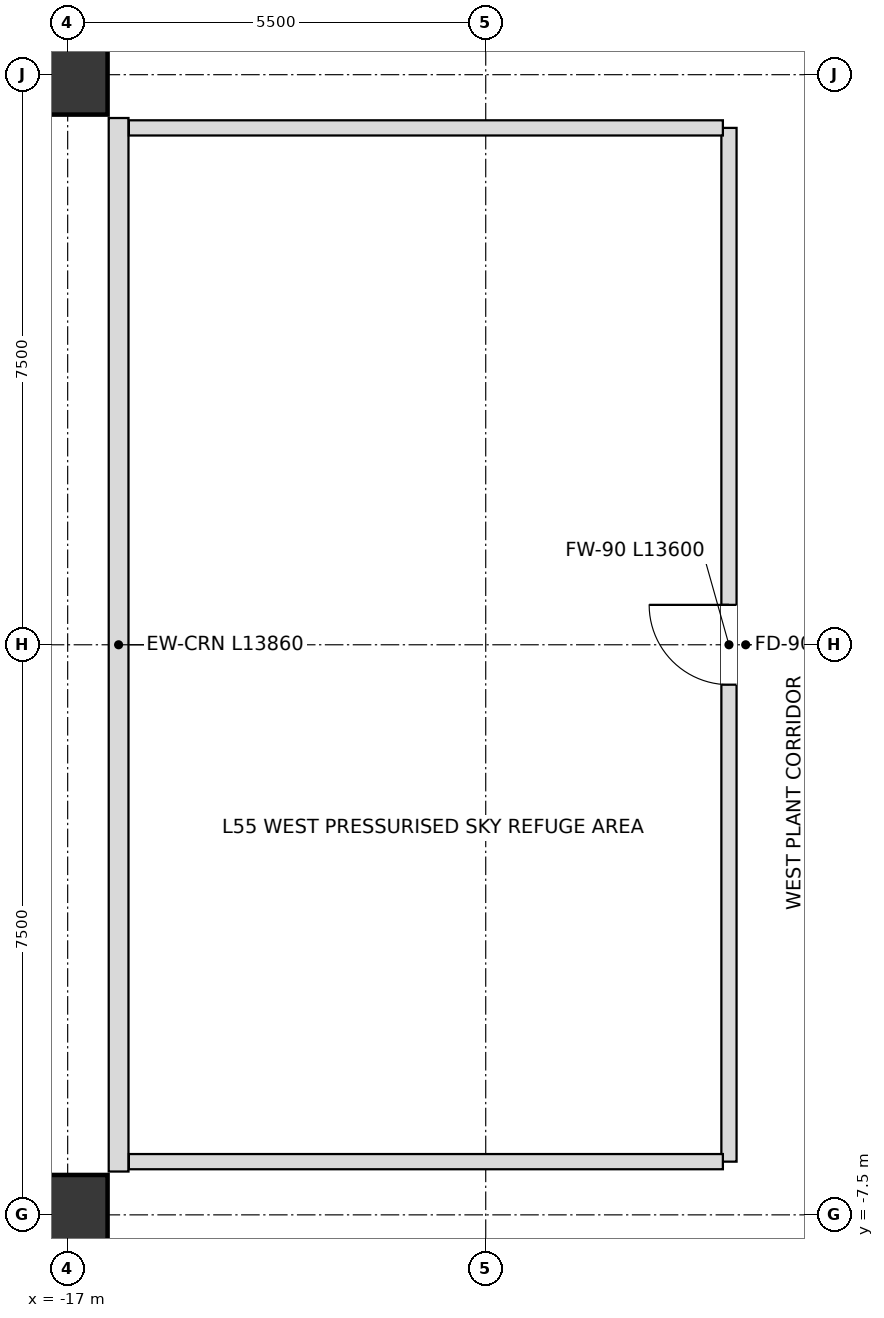
"""IFC4 building model, lengths in metres.
Left out: names, types, materials, properties, quantities, classifications, styles, units other than length and angle.
Written with IfcOpenShell. Run it as: python <this file> out.ifc"""

import sys

from ifc_helpers import new_model, si_unit, direction, frame, frame_2d, origin, origin_2d, place, context, subcontext, project, spatial, rectangle, extrude, element, fill, save


model = new_model("IFC4")
c1 = context("Model", 3, precision=1e-05, world=origin(), true_north=direction((0.0, 1.0)))
c2 = subcontext(c1, "Body", "Model", "MODEL_VIEW")
j1 = project(units=[si_unit("LENGTHUNIT", "METRE"), si_unit("PLANEANGLEUNIT", "RADIAN")], contexts=[c1])
p1 = place(None, origin())
s1 = spatial("IfcSite", under=j1, at=p1, CompositionType="ELEMENT")
p2 = place(p1, origin())
s2 = spatial("IfcBuilding", under=s1, at=p2, CompositionType="ELEMENT")
p3 = place(p2, frame((0.0, 0.0, 212.4)))
s3 = spatial("IfcBuildingStorey", under=s2, at=p3, CompositionType="ELEMENT", Elevation=212.4)
for number, where, z_axis, x_axis in (
    (1, (-17.0, 7.5, 0.0), (0.0, 0.0, 1.0), (1.0, 0.0, 0.0)),
    (2, (-17.0, -7.5, 0.0), (0.0, 0.0, 1.0), (1.0, 0.0, 0.0)),
):
    element("IfcColumn", number, at=place(p3, frame(where, z_axis=z_axis, x_axis=x_axis)), inside=s3, PredefinedType="USERDEFINED", context=c2, shape_type="SweptSolid", body=[
        extrude(rectangle(XDim=1.05, YDim=1.05, at=origin_2d()), origin(), (0.0, 0.0, 1.0), 5.4),
    ])
p4 = place(p3, frame((-16.33, -6.93, 0.0), z_axis=(0.0, 0.0, 1.0), x_axis=(0.0, 1.0, 0.0)))
e3 = element("IfcWall", 3, at=p4, inside=s3, PredefinedType="SOLIDWALL", context=c2, shape_type="SweptSolid", body=[
    extrude(rectangle(XDim=13.86, YDim=0.26, at=frame_2d((6.93, 0.0))), origin(), (0.0, 0.0, 1.0), 5.1),
])
p5 = place(p3, frame((-8.3, -6.8, 0.0), z_axis=(0.0, 0.0, 1.0), x_axis=(0.0, 1.0, 0.0)))
e4 = element("IfcWall", 4, at=p5, inside=s3, PredefinedType="SOLIDWALL", context=c2, shape_type="SweptSolid", body=[
    extrude(rectangle(XDim=13.6, YDim=0.2, at=frame_2d((6.8, 0.0))), origin(), (0.0, 0.0, 1.0), 5.1),
])
p6 = place(p5, frame((6.275, 0.0, 0.0)))
e5 = element("IfcOpeningElement", 5, at=p6, cuts=e4, PredefinedType="OPENING", context=c2, shape_type="SweptSolid", body=[
    extrude(rectangle(XDim=1.05, YDim=2.15, at=frame_2d((0.525, 1.075))), frame((0.0, 0.11, 0.0), z_axis=(0.0, -1.0, 0.0), x_axis=(1.0, 0.0, 0.0)), (0.0, 0.0, 1.0), 0.22),
])
for number, where, z_axis, x_axis in (
    (6, (-16.195, -6.8, 0.0), (0.0, 0.0, 1.0), (1.0, 0.0, 0.0)),
    (7, (-16.195, 6.8, 0.0), (0.0, 0.0, 1.0), (1.0, 0.0, 0.0)),
):
    element("IfcWall", number, at=place(p3, frame(where, z_axis=z_axis, x_axis=x_axis)), inside=s3, PredefinedType="SOLIDWALL", context=c2, shape_type="SweptSolid", body=[
        extrude(rectangle(XDim=7.815, YDim=0.2, at=frame_2d((3.908, 0.0))), origin(), (0.0, 0.0, 1.0), 4.738),
    ])
p7 = place(p6, origin())
e8 = element("IfcDoor", 8, at=p7, inside=s3, OperationType="SINGLE_SWING_RIGHT", PredefinedType="DOOR", context=c2, shape_type="SweptSolid", body=[
    extrude(rectangle(XDim=1.05, YDim=2.15, at=frame_2d((0.525, 1.075))), frame((0.0, 0.025, 0.0), z_axis=(0.0, -1.0, 0.0), x_axis=(1.0, 0.0, 0.0)), (0.0, 0.0, 1.0), 0.05),
])
fill(e5, e8)
save(model, sys.argv[1])
